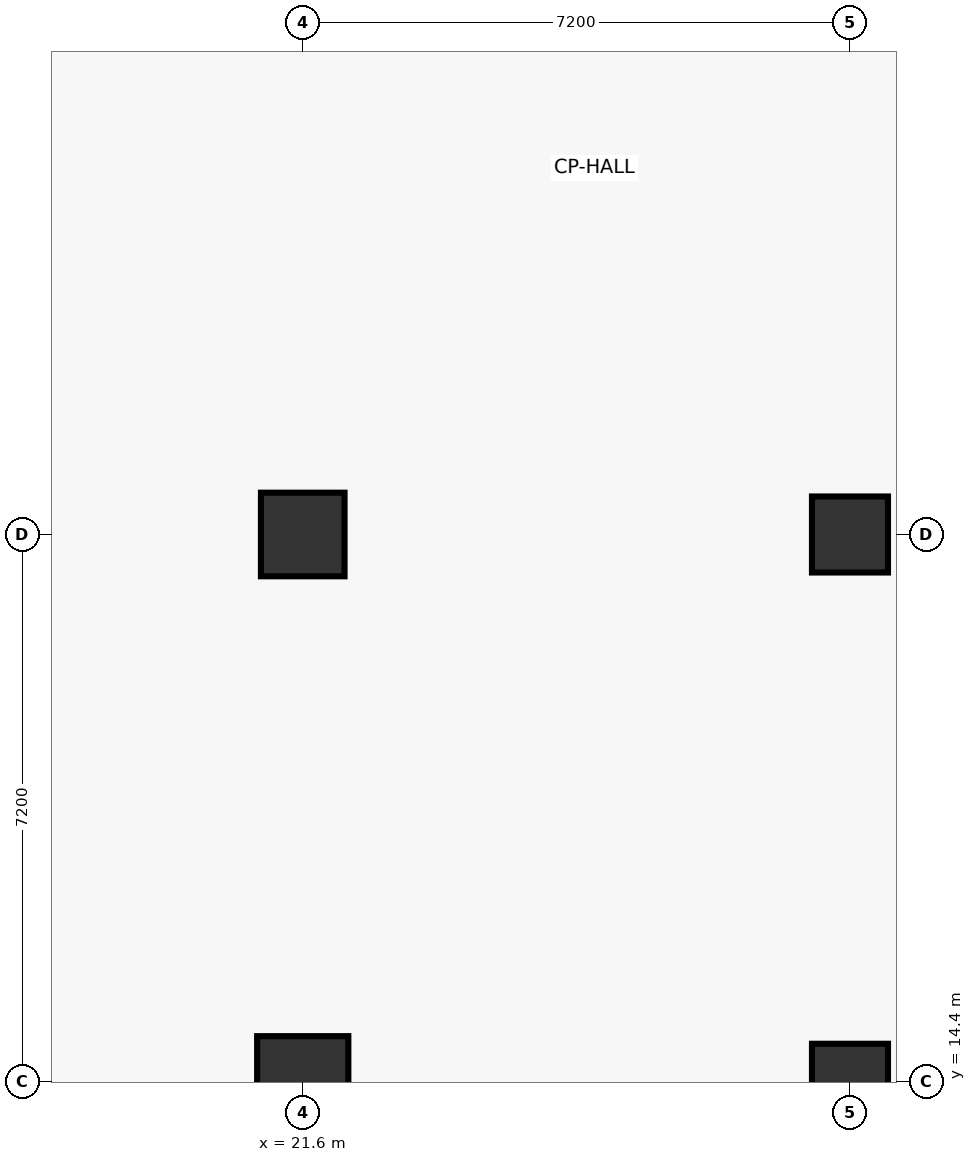
"""IFC4 building model, lengths in metres.
Left out: names, types, materials, properties, quantities, classifications, styles, units other than length and angle.
Written with IfcOpenShell. Run it as: python <this file> out.ifc"""

import sys

from ifc_helpers import new_model, si_unit, direction, frame, origin, origin_2d, place, context, subcontext, project, spatial, rectangle, circle, extrude, element, save


model = new_model("IFC4")
c1 = context("Model", 3, precision=1e-05, world=origin(), true_north=direction((0.0, 1.0)))
c2 = subcontext(c1, "Body", "Model", "MODEL_VIEW")
j1 = project(units=[si_unit("LENGTHUNIT", "METRE"), si_unit("PLANEANGLEUNIT", "RADIAN")], contexts=[c1])
p1 = place(None, origin())
s1 = spatial("IfcSite", under=j1, at=p1, CompositionType="ELEMENT")
p2 = place(p1, origin())
s2 = spatial("IfcBuilding", under=s1, at=p2, CompositionType="ELEMENT")
p3 = place(p2, frame((0.0, 0.0, -5.4)))
s3 = spatial("IfcBuildingStorey", under=s2, at=p3, CompositionType="ELEMENT", Elevation=-5.4)
p4 = place(p3, frame((21.6, 14.4, 0.0), z_axis=(0.0, 0.0, 1.0), x_axis=(1.0, 0.0, 0.0)))
e1 = element("IfcColumn", 1, at=p4, inside=s3, PredefinedType="COLUMN", context=c2, shape_type="SweptSolid", body=[
    extrude(circle(Radius=0.6, at=origin_2d()), origin(), (0.0, 0.0, 1.0), 5.4),
])
p5 = place(p3, frame((21.6, 21.6, 0.0), z_axis=(0.0, 0.0, 1.0), x_axis=(1.0, 0.0, 0.0)))
e2 = element("IfcColumn", 2, at=p5, inside=s3, PredefinedType="COLUMN", context=c2, shape_type="SweptSolid", body=[
    extrude(rectangle(XDim=1.1, YDim=1.1, at=origin_2d()), origin(), (0.0, 0.0, 1.0), 5.4),
])
p6 = place(p3, frame((28.8, 14.4, 0.0), z_axis=(0.0, 0.0, 1.0), x_axis=(1.0, 0.0, 0.0)))
e3 = element("IfcColumn", 3, at=p6, inside=s3, PredefinedType="COLUMN", context=c2, shape_type="SweptSolid", body=[
    extrude(circle(Radius=0.5, at=origin_2d()), origin(), (0.0, 0.0, 1.0), 5.4),
])
p7 = place(p3, frame((28.8, 21.6, 0.0), z_axis=(0.0, 0.0, 1.0), x_axis=(1.0, 0.0, 0.0)))
e4 = element("IfcColumn", 4, at=p7, inside=s3, PredefinedType="COLUMN", context=c2, shape_type="SweptSolid", body=[
    extrude(rectangle(XDim=1.0, YDim=1.0, at=origin_2d()), origin(), (0.0, 0.0, 1.0), 5.4),
])
save(model, sys.argv[1])
